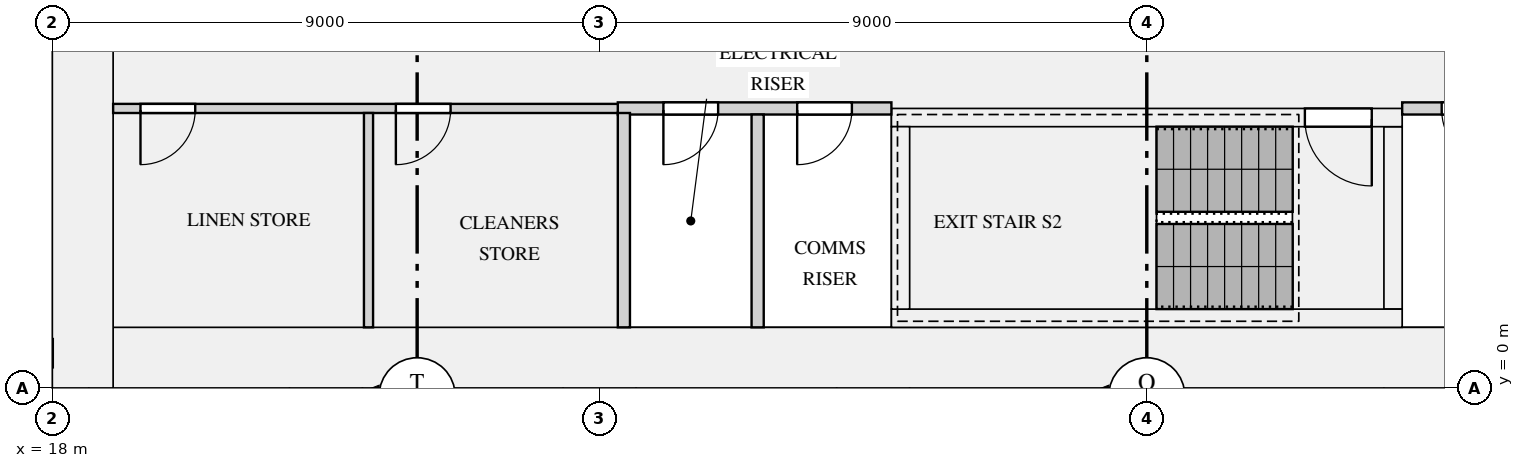
"""IFC4 building model, lengths in metres.
Left out: names, types, materials, properties, quantities, classifications, styles, units other than length and angle.
Written with IfcOpenShell. Run it as: python <this file> out.ifc"""

import sys

from ifc_helpers import new_model, si_unit, direction, frame, frame_2d, origin, place, context, subcontext, project, spatial, rectangle, extrude, element, fill, save


model = new_model("IFC4")
c1 = context("Model", 3, precision=1e-05, world=origin(), true_north=direction((0.0, 1.0)))
c2 = subcontext(c1, "Body", "Model", "MODEL_VIEW")
j1 = project(units=[si_unit("LENGTHUNIT", "METRE"), si_unit("PLANEANGLEUNIT", "RADIAN")], contexts=[c1])
p1 = place(None, origin())
s1 = spatial("IfcSite", under=j1, at=p1, CompositionType="ELEMENT")
p2 = place(p1, origin())
s2 = spatial("IfcBuilding", under=s1, at=p2, CompositionType="ELEMENT")
p3 = place(p2, frame((0.0, 0.0, 38.4)))
s3 = spatial("IfcBuildingStorey", under=s2, at=p3, CompositionType="ELEMENT", Elevation=38.4)
p4 = place(p3, frame((18.5, 0.0, 0.0), z_axis=(0.0, 0.0, 1.0), x_axis=(0.0, 1.0, 0.0)))
e1 = element("IfcWall", 1, at=p4, inside=s3, PredefinedType="SHEAR", context=c2, shape_type="SweptSolid", body=[
    extrude(rectangle(XDim=12.5, YDim=1.0, at=frame_2d((6.25, 0.0))), origin(), (0.0, 0.0, 1.0), 3.15),
])
p5 = place(p3, frame((19.0, 0.5, 0.0), z_axis=(0.0, 0.0, 1.0), x_axis=(1.0, 0.0, 0.0)))
e2 = element("IfcWall", 2, at=p5, inside=s3, PredefinedType="SHEAR", context=c2, shape_type="SweptSolid", body=[
    extrude(rectangle(XDim=34.0, YDim=1.0, at=frame_2d((17.0, 0.0))), origin(), (0.0, 0.0, 1.0), 3.15),
])
p6 = place(p3, frame((31.8, 1.15, 0.0), z_axis=(0.0, 0.0, 1.0), x_axis=(1.0, 0.0, 0.0)))
e3 = element("IfcWall", 3, at=p6, inside=s3, PredefinedType="SHEAR", context=c2, shape_type="SweptSolid", body=[
    extrude(rectangle(XDim=8.4, YDim=0.3, at=frame_2d((4.2, 0.0))), origin(), (0.0, 0.0, 1.0), 3.15),
])
p7 = place(p3, frame((31.8, 4.45, 0.0), z_axis=(0.0, 0.0, 1.0), x_axis=(1.0, 0.0, 0.0)))
e4 = element("IfcWall", 4, at=p7, inside=s3, PredefinedType="SHEAR", context=c2, shape_type="SweptSolid", body=[
    extrude(rectangle(XDim=8.4, YDim=0.3, at=frame_2d((4.2, 0.0))), origin(), (0.0, 0.0, 1.0), 3.15),
])
p8 = place(p7, frame((6.8, 0.0, 0.0)))
e5 = element("IfcOpeningElement", 5, at=p8, cuts=e4, PredefinedType="OPENING", context=c2, shape_type="SweptSolid", body=[
    extrude(rectangle(XDim=1.1, YDim=2.1, at=frame_2d((0.55, 1.05))), frame((0.0, 0.16, 0.0), z_axis=(0.0, -1.0, 0.0), x_axis=(1.0, 0.0, 0.0)), (0.0, 0.0, 1.0), 0.32),
])
for number, where, z_axis, x_axis in (
    (6, (31.95, 1.3, 0.0), (0.0, 0.0, 1.0), (0.0, 1.0, 0.0)),
    (7, (40.05, 1.3, 0.0), (0.0, 0.0, 1.0), (0.0, 1.0, 0.0)),
):
    element("IfcWall", number, at=place(p3, frame(where, z_axis=z_axis, x_axis=x_axis)), inside=s3, PredefinedType="SHEAR", context=c2, shape_type="SweptSolid", body=[
        extrude(rectangle(XDim=3.0, YDim=0.3, at=frame_2d((1.5, 0.0))), origin(), (0.0, 0.0, 1.0), 3.15),
    ])
p9 = place(p3, frame((27.3, 4.6, 0.0), z_axis=(0.0, 0.0, 1.0), x_axis=(1.0, 0.0, 0.0)))
e8 = element("IfcWall", 8, at=p9, inside=s3, PredefinedType="PARTITIONING", context=c2, shape_type="SweptSolid", body=[
    extrude(rectangle(XDim=4.5, YDim=0.2, at=frame_2d((2.25, 0.0))), origin(), (0.0, 0.0, 1.0), 2.83),
])
p10 = place(p9, frame((0.75, 0.0, 0.0)))
e9 = element("IfcOpeningElement", 9, at=p10, cuts=e8, PredefinedType="OPENING", context=c2, shape_type="SweptSolid", body=[
    extrude(rectangle(XDim=0.9, YDim=2.1, at=frame_2d((0.45, 1.05))), frame((0.0, 0.11, 0.0), z_axis=(0.0, -1.0, 0.0), x_axis=(1.0, 0.0, 0.0)), (0.0, 0.0, 1.0), 0.22),
])
p11 = place(p9, frame((2.95, 0.0, 0.0)))
e10 = element("IfcOpeningElement", 10, at=p11, cuts=e8, PredefinedType="OPENING", context=c2, shape_type="SweptSolid", body=[
    extrude(rectangle(XDim=0.9, YDim=2.1, at=frame_2d((0.45, 1.05))), frame((0.0, 0.11, 0.0), z_axis=(0.0, -1.0, 0.0), x_axis=(1.0, 0.0, 0.0)), (0.0, 0.0, 1.0), 0.22),
])
p12 = place(p3, frame((40.2, 4.6, 0.0), z_axis=(0.0, 0.0, 1.0), x_axis=(1.0, 0.0, 0.0)))
e11 = element("IfcWall", 11, at=p12, inside=s3, PredefinedType="PARTITIONING", context=c2, shape_type="SweptSolid", body=[
    extrude(rectangle(XDim=4.5, YDim=0.2, at=frame_2d((2.25, 0.0))), origin(), (0.0, 0.0, 1.0), 2.83),
])
p13 = place(p12, frame((0.65, 0.0, 0.0)))
e12 = element("IfcOpeningElement", 12, at=p13, cuts=e11, PredefinedType="OPENING", context=c2, shape_type="SweptSolid", body=[
    extrude(rectangle(XDim=0.9, YDim=2.1, at=frame_2d((0.45, 1.05))), frame((0.0, 0.11, 0.0), z_axis=(0.0, -1.0, 0.0), x_axis=(1.0, 0.0, 0.0)), (0.0, 0.0, 1.0), 0.22),
])
p14 = place(p12, frame((2.85, 0.0, 0.0)))
e13 = element("IfcOpeningElement", 13, at=p14, cuts=e11, PredefinedType="OPENING", context=c2, shape_type="SweptSolid", body=[
    extrude(rectangle(XDim=0.9, YDim=2.1, at=frame_2d((0.45, 1.05))), frame((0.0, 0.11, 0.0), z_axis=(0.0, -1.0, 0.0), x_axis=(1.0, 0.0, 0.0)), (0.0, 0.0, 1.0), 0.22),
])
p15 = place(p3, frame((19.0, 4.6, 0.0), z_axis=(0.0, 0.0, 1.0), x_axis=(1.0, 0.0, 0.0)))
e14 = element("IfcWall", 14, at=p15, inside=s3, PredefinedType="PARTITIONING", context=c2, shape_type="SweptSolid", body=[
    extrude(rectangle(XDim=8.3, YDim=0.15, at=frame_2d((4.15, 0.0))), origin(), (0.0, 0.0, 1.0), 2.83),
])
p16 = place(p15, frame((0.45, 0.0, 0.0)))
e15 = element("IfcOpeningElement", 15, at=p16, cuts=e14, PredefinedType="OPENING", context=c2, shape_type="SweptSolid", body=[
    extrude(rectangle(XDim=0.9, YDim=2.1, at=frame_2d((0.45, 1.05))), frame((0.0, 0.085, 0.0), z_axis=(0.0, -1.0, 0.0), x_axis=(1.0, 0.0, 0.0)), (0.0, 0.0, 1.0), 0.17),
])
p17 = place(p15, frame((4.65, 0.0, 0.0)))
e16 = element("IfcOpeningElement", 16, at=p17, cuts=e14, PredefinedType="OPENING", context=c2, shape_type="SweptSolid", body=[
    extrude(rectangle(XDim=0.9, YDim=2.1, at=frame_2d((0.45, 1.05))), frame((0.0, 0.085, 0.0), z_axis=(0.0, -1.0, 0.0), x_axis=(1.0, 0.0, 0.0)), (0.0, 0.0, 1.0), 0.17),
])
p18 = place(p3, frame((23.2, 1.0, 0.0), z_axis=(0.0, 0.0, 1.0), x_axis=(0.0, 1.0, 0.0)))
e17 = element("IfcWall", 17, at=p18, inside=s3, PredefinedType="PARTITIONING", context=c2, shape_type="SweptSolid", body=[
    extrude(rectangle(XDim=3.525, YDim=0.15, at=frame_2d((1.762, 0.0))), origin(), (0.0, 0.0, 1.0), 2.83),
])
p19 = place(p3, frame((27.4, 1.0, 0.0), z_axis=(0.0, 0.0, 1.0), x_axis=(0.0, 1.0, 0.0)))
e18 = element("IfcWall", 18, at=p19, inside=s3, PredefinedType="PARTITIONING", context=c2, shape_type="SweptSolid", body=[
    extrude(rectangle(XDim=3.525, YDim=0.2, at=frame_2d((1.762, 0.0))), origin(), (0.0, 0.0, 1.0), 2.83),
])
p20 = place(p3, frame((29.6, 1.0, 0.0), z_axis=(0.0, 0.0, 1.0), x_axis=(0.0, 1.0, 0.0)))
e19 = element("IfcWall", 19, at=p20, inside=s3, PredefinedType="PARTITIONING", context=c2, shape_type="SweptSolid", body=[
    extrude(rectangle(XDim=3.5, YDim=0.2, at=frame_2d((1.75, 0.0))), origin(), (0.0, 0.0, 1.0), 2.83),
])
p21 = place(p8, frame((1.1, 0.0, 0.0), z_axis=(0.0, 0.0, 1.0), x_axis=(-1.0, 0.0, 0.0)))
e20 = element("IfcDoor", 20, at=p21, inside=s3, OperationType="SINGLE_SWING_LEFT", PredefinedType="DOOR", context=c2, shape_type="SweptSolid", body=[
    extrude(rectangle(XDim=1.1, YDim=2.1, at=frame_2d((0.55, 1.05))), frame((0.0, 0.025, 0.0), z_axis=(0.0, -1.0, 0.0), x_axis=(1.0, 0.0, 0.0)), (0.0, 0.0, 1.0), 0.05),
])
fill(e5, e20)
p22 = place(p16, frame((0.9, 0.0, 0.0), z_axis=(0.0, 0.0, 1.0), x_axis=(-1.0, 0.0, 0.0)))
e21 = element("IfcDoor", 21, at=p22, inside=s3, OperationType="SINGLE_SWING_RIGHT", PredefinedType="DOOR", context=c2, shape_type="SweptSolid", body=[
    extrude(rectangle(XDim=0.9, YDim=2.1, at=frame_2d((0.45, 1.05))), frame((0.0, 0.025, 0.0), z_axis=(0.0, -1.0, 0.0), x_axis=(1.0, 0.0, 0.0)), (0.0, 0.0, 1.0), 0.05),
])
fill(e15, e21)
p23 = place(p17, frame((0.9, 0.0, 0.0), z_axis=(0.0, 0.0, 1.0), x_axis=(-1.0, 0.0, 0.0)))
e22 = element("IfcDoor", 22, at=p23, inside=s3, OperationType="SINGLE_SWING_RIGHT", PredefinedType="DOOR", context=c2, shape_type="SweptSolid", body=[
    extrude(rectangle(XDim=0.9, YDim=2.1, at=frame_2d((0.45, 1.05))), frame((0.0, 0.025, 0.0), z_axis=(0.0, -1.0, 0.0), x_axis=(1.0, 0.0, 0.0)), (0.0, 0.0, 1.0), 0.05),
])
fill(e16, e22)
p24 = place(p10, frame((0.9, 0.0, 0.0), z_axis=(0.0, 0.0, 1.0), x_axis=(-1.0, 0.0, 0.0)))
e23 = element("IfcDoor", 23, at=p24, inside=s3, OperationType="SINGLE_SWING_RIGHT", PredefinedType="DOOR", context=c2, shape_type="SweptSolid", body=[
    extrude(rectangle(XDim=0.9, YDim=2.1, at=frame_2d((0.45, 1.05))), frame((0.0, 0.025, 0.0), z_axis=(0.0, -1.0, 0.0), x_axis=(1.0, 0.0, 0.0)), (0.0, 0.0, 1.0), 0.05),
])
fill(e9, e23)
p25 = place(p11, frame((0.9, 0.0, 0.0), z_axis=(0.0, 0.0, 1.0), x_axis=(-1.0, 0.0, 0.0)))
e24 = element("IfcDoor", 24, at=p25, inside=s3, OperationType="SINGLE_SWING_RIGHT", PredefinedType="DOOR", context=c2, shape_type="SweptSolid", body=[
    extrude(rectangle(XDim=0.9, YDim=2.1, at=frame_2d((0.45, 1.05))), frame((0.0, 0.025, 0.0), z_axis=(0.0, -1.0, 0.0), x_axis=(1.0, 0.0, 0.0)), (0.0, 0.0, 1.0), 0.05),
])
fill(e10, e24)
p26 = place(p13, frame((0.9, 0.0, 0.0), z_axis=(0.0, 0.0, 1.0), x_axis=(-1.0, 0.0, 0.0)))
e25 = element("IfcDoor", 25, at=p26, inside=s3, OperationType="SINGLE_SWING_LEFT", PredefinedType="DOOR", context=c2, shape_type="SweptSolid", body=[
    extrude(rectangle(XDim=0.9, YDim=2.1, at=frame_2d((0.45, 1.05))), frame((0.0, 0.025, 0.0), z_axis=(0.0, -1.0, 0.0), x_axis=(1.0, 0.0, 0.0)), (0.0, 0.0, 1.0), 0.05),
])
fill(e12, e25)
save(model, sys.argv[1])
